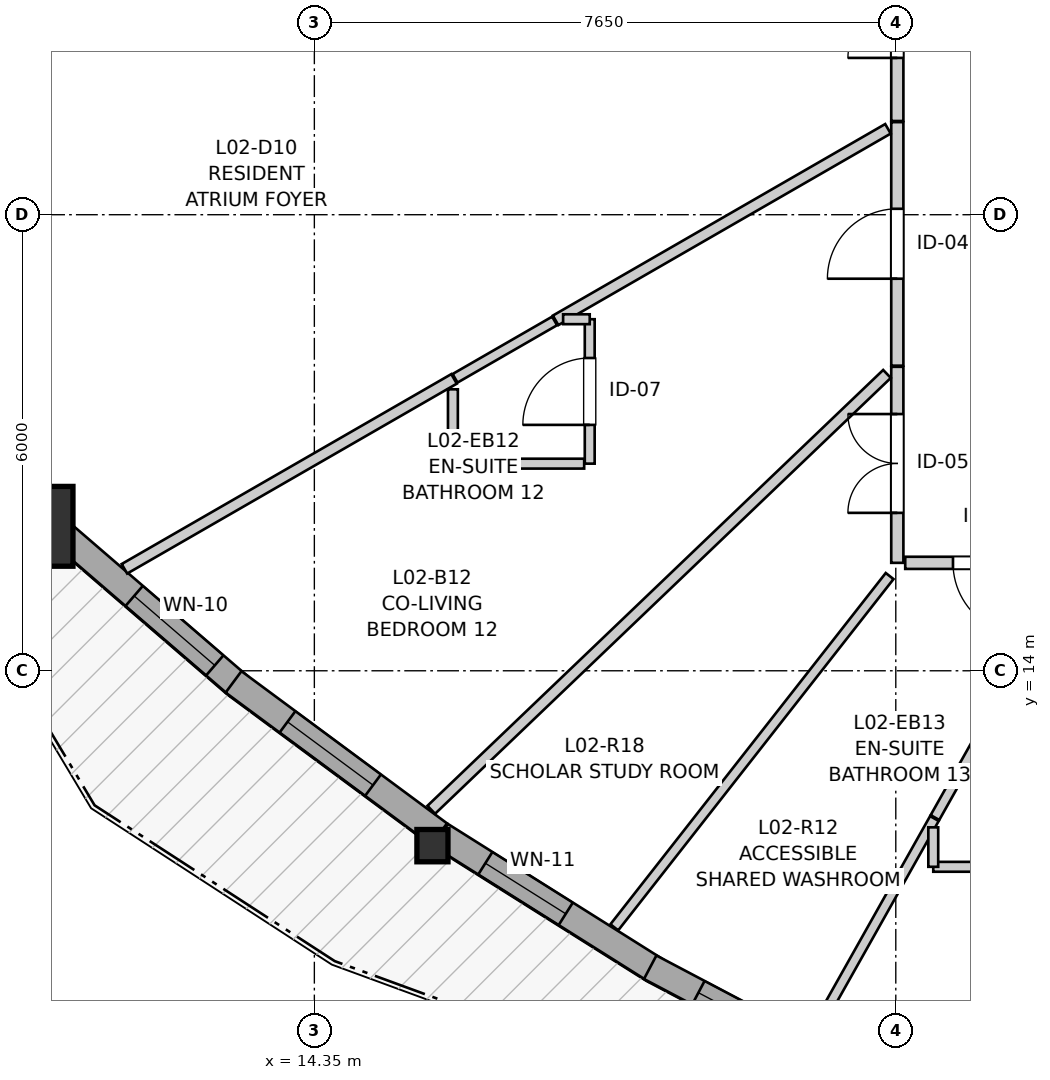
"""IFC4 building model, lengths in metres.
Left out: names, types, materials, properties, quantities, classifications, styles, units other than length and angle.
Written with IfcOpenShell. Run it as: python <this file> out.ifc"""

import sys

from ifc_helpers import new_model, si_unit, direction, frame, frame_2d, origin, origin_2d, place, context, subcontext, project, spatial, rectangle, i_section, extrude, source, transform, mapped, element, fill, save


model = new_model("IFC4")
c1 = context("Model", 3, precision=1e-05, world=origin(), true_north=direction((0.0, 1.0)))
c2 = subcontext(c1, "Body", "Model", "MODEL_VIEW")
j1 = project(units=[si_unit("LENGTHUNIT", "METRE"), si_unit("PLANEANGLEUNIT", "RADIAN")], contexts=[c1])
p1 = place(None, origin())
s1 = spatial("IfcSite", under=j1, at=p1, CompositionType="ELEMENT")
p2 = place(p1, origin())
s2 = spatial("IfcBuilding", under=s1, at=p2, CompositionType="ELEMENT")
p3 = place(p2, frame((0.0, 0.0, 11.0)))
s3 = spatial("IfcBuildingStorey", under=s2, at=p3, CompositionType="ELEMENT", Elevation=11.0)
m1 = source(origin(), c2, "Body", "SweptSolid", [
    extrude(rectangle(XDim=1.05, YDim=1.05, at=origin_2d()), origin(), (0.0, 0.0, 1.0), 2.94),
])
p4 = place(p3, frame((10.649, 15.9, 0.0), z_axis=(0.0, 0.0, 1.0), x_axis=(1.0, 0.0, 0.0)))
e1 = element("IfcColumn", 1, at=p4, inside=s3, PredefinedType="COLUMN", context=c2, shape_type="MappedRepresentation", body=[
    mapped(m1, transform((0.0, 0.0, 0.0), x_axis=(1.0, 0.0, 0.0), y_axis=(0.0, 1.0, 0.0), z_axis=(0.0, 0.0, 1.0), scale=1.0)),
])
m2 = source(origin(), c2, "Body", "SweptSolid", [
    extrude(i_section(OverallWidth=0.409, OverallDepth=0.425, WebThickness=0.03, FlangeThickness=0.048, FilletRadius=0.015, at=origin_2d()), origin(), (0.0, 0.0, 1.0), 2.94),
])
p5 = place(p3, frame((15.904, 11.699, 0.0), z_axis=(0.0, 0.0, 1.0), x_axis=(1.0, 0.0, 0.0)))
e2 = element("IfcColumn", 2, at=p5, inside=s3, PredefinedType="PILASTER", context=c2, shape_type="MappedRepresentation", body=[
    mapped(m2, transform((0.0, 0.0, 0.0), x_axis=(1.0, 0.0, 0.0), y_axis=(0.0, 1.0, 0.0), z_axis=(0.0, 0.0, 1.0), scale=1.0)),
])
p6 = place(p3, frame((10.99, 15.837, 0.0), z_axis=(0.0, 0.0, 1.0), x_axis=(0.757465946779, -0.652874673632, 0.0)))
e3 = element("IfcWall", 3, at=p6, inside=s3, PredefinedType="SOLIDWALL", context=c2, shape_type="SweptSolid", body=[
    extrude(rectangle(XDim=3.123, YDim=0.35, at=frame_2d((1.562, 0.0))), origin(), (0.0, 0.0, 1.0), 2.42),
])
p7 = place(p6, frame((1.305, 0.0, 0.82)))
e4 = element("IfcOpeningElement", 4, at=p7, cuts=e3, PredefinedType="OPENING", context=c2, shape_type="SweptSolid", body=[
    extrude(rectangle(XDim=1.4, YDim=1.35, at=frame_2d((0.7, 0.675))), frame((0.0, 0.185, 0.0), z_axis=(0.0, -1.0, 0.0), x_axis=(1.0, 0.0, 0.0)), (0.0, 0.0, 1.0), 0.37),
])
p8 = place(p3, frame((13.287, 13.854, 0.0), z_axis=(0.0, 0.0, 1.0), x_axis=(0.803848837202, -0.594833629622, 0.0)))
e5 = element("IfcWall", 5, at=p8, inside=s3, PredefinedType="SOLIDWALL", context=c2, shape_type="SweptSolid", body=[
    extrude(rectangle(XDim=3.365, YDim=0.35, at=frame_2d((1.683, 0.0))), origin(), (0.0, 0.0, 1.0), 2.42),
])
p9 = place(p8, frame((0.883, 0.0, 0.82)))
e6 = element("IfcOpeningElement", 6, at=p9, cuts=e5, PredefinedType="OPENING", context=c2, shape_type="SweptSolid", body=[
    extrude(rectangle(XDim=1.4, YDim=1.35, at=frame_2d((0.7, 0.675))), frame((0.0, 0.185, 0.0), z_axis=(0.0, -1.0, 0.0), x_axis=(1.0, 0.0, 0.0)), (0.0, 0.0, 1.0), 0.37),
])
p10 = place(p3, frame((16.014, 11.837, 0.0), z_axis=(0.0, 0.0, 1.0), x_axis=(0.846420438233, -0.532515203295, 0.0)))
e7 = element("IfcWall", 7, at=p10, inside=s3, PredefinedType="SOLIDWALL", context=c2, shape_type="SweptSolid", body=[
    extrude(rectangle(XDim=3.346, YDim=0.35, at=frame_2d((1.673, 0.0))), origin(), (0.0, 0.0, 1.0), 2.42),
])
p11 = place(p10, frame((0.692, 0.0, 0.82)))
e8 = element("IfcOpeningElement", 8, at=p11, cuts=e7, PredefinedType="OPENING", context=c2, shape_type="SweptSolid", body=[
    extrude(rectangle(XDim=1.25, YDim=1.35, at=frame_2d((0.625, 0.675))), frame((0.0, 0.185, 0.0), z_axis=(0.0, -1.0, 0.0), x_axis=(1.0, 0.0, 0.0)), (0.0, 0.0, 1.0), 0.37),
])
p12 = place(p3, frame((18.769, 10.1, 0.0), z_axis=(0.0, 0.0, 1.0), x_axis=(0.884401188265, -0.466727477438, 0.0)))
e9 = element("IfcWall", 9, at=p12, inside=s3, PredefinedType="SOLIDWALL", context=c2, shape_type="SweptSolid", body=[
    extrude(rectangle(XDim=3.066, YDim=0.35, at=frame_2d((1.533, 0.0))), origin(), (0.0, 0.0, 1.0), 2.42),
])
p13 = place(p12, frame((0.717, 0.0, 0.82)))
e10 = element("IfcOpeningElement", 10, at=p13, cuts=e9, PredefinedType="OPENING", context=c2, shape_type="SweptSolid", body=[
    extrude(rectangle(XDim=0.95, YDim=1.35, at=frame_2d((0.475, 0.675))), frame((0.0, 0.185, 0.0), z_axis=(0.0, -1.0, 0.0), x_axis=(1.0, 0.0, 0.0)), (0.0, 0.0, 1.0), 0.37),
])
p14 = place(p3, frame((22.02, 18.014, 0.0), z_axis=(0.0, 0.0, 1.0), x_axis=(0.0, 1.0, 0.0)))
e11 = element("IfcWall", 11, at=p14, inside=s3, PredefinedType="PARTITIONING", context=c2, shape_type="SweptSolid", body=[
    extrude(rectangle(XDim=3.204, YDim=0.16, at=frame_2d((1.602, 0.0))), origin(), (0.0, 0.0, 1.0), 2.94),
])
p15 = place(p14, frame((1.144, 0.0, 0.0)))
e12 = element("IfcOpeningElement", 12, at=p15, cuts=e11, PredefinedType="OPENING", context=c2, shape_type="SweptSolid", body=[
    extrude(rectangle(XDim=0.92, YDim=2.1, at=frame_2d((0.46, 1.05))), frame((0.0, 0.09, 0.0), z_axis=(0.0, -1.0, 0.0), x_axis=(1.0, 0.0, 0.0)), (0.0, 0.0, 1.0), 0.18),
])
p16 = place(p3, frame((22.02, 21.233, 0.0), z_axis=(0.0, 0.0, 1.0), x_axis=(0.0, 1.0, 0.0)))
e13 = element("IfcWall", 13, at=p16, inside=s3, PredefinedType="PARTITIONING", context=c2, shape_type="SweptSolid", body=[
    extrude(rectangle(XDim=2.917, YDim=0.16, at=frame_2d((1.458, 0.0))), origin(), (0.0, 0.0, 1.0), 2.94),
])
p17 = place(p16, frame((0.83, 0.0, 0.0)))
e14 = element("IfcOpeningElement", 14, at=p17, cuts=e13, PredefinedType="OPENING", context=c2, shape_type="SweptSolid", body=[
    extrude(rectangle(XDim=1.3, YDim=2.1, at=frame_2d((0.65, 1.05))), frame((0.0, 0.09, 0.0), z_axis=(0.0, -1.0, 0.0), x_axis=(1.0, 0.0, 0.0)), (0.0, 0.0, 1.0), 0.18),
])
p18 = place(p3, frame((22.02, 15.42, 0.0), z_axis=(0.0, 0.0, 1.0), x_axis=(0.0, 1.0, 0.0)))
e15 = element("IfcWall", 15, at=p18, inside=s3, PredefinedType="PARTITIONING", context=c2, shape_type="SweptSolid", body=[
    extrude(rectangle(XDim=2.579, YDim=0.16, at=frame_2d((1.29, 0.0))), origin(), (0.0, 0.0, 1.0), 2.94),
])
p19 = place(p18, frame((0.657, 0.0, 0.0)))
e16 = element("IfcOpeningElement", 16, at=p19, cuts=e15, PredefinedType="OPENING", context=c2, shape_type="SweptSolid", body=[
    extrude(rectangle(XDim=1.3, YDim=2.1, at=frame_2d((0.65, 1.05))), frame((0.0, 0.09, 0.0), z_axis=(0.0, -1.0, 0.0), x_axis=(1.0, 0.0, 0.0)), (0.0, 0.0, 1.0), 0.18),
])
p20 = place(p3, frame((24.368, 15.42, 0.0), z_axis=(0.0, 0.0, 1.0), x_axis=(-1.0, 0.0, 0.0)))
e17 = element("IfcWall", 17, at=p20, inside=s3, PredefinedType="PARTITIONING", context=c2, shape_type="SweptSolid", body=[
    extrude(rectangle(XDim=2.244, YDim=0.16, at=frame_2d((1.122, 0.0))), origin(), (0.0, 0.0, 1.0), 2.94),
])
p21 = place(p20, frame((0.666, 0.0, 0.0)))
e18 = element("IfcOpeningElement", 18, at=p21, cuts=e17, PredefinedType="OPENING", context=c2, shape_type="SweptSolid", body=[
    extrude(rectangle(XDim=0.95, YDim=2.1, at=frame_2d((0.475, 1.05))), frame((0.0, 0.09, 0.0), z_axis=(0.0, -1.0, 0.0), x_axis=(1.0, 0.0, 0.0)), (0.0, 0.0, 1.0), 0.18),
])
p22 = place(p3, frame((17.973, 16.725, 0.0), z_axis=(0.0, 0.0, 1.0), x_axis=(0.0, 1.0, 0.0)))
e19 = element("IfcWall", 19, at=p22, inside=s3, PredefinedType="PARTITIONING", context=c2, shape_type="SweptSolid", body=[
    extrude(rectangle(XDim=1.9, YDim=0.13, at=frame_2d((0.95, 0.0))), origin(), (0.0, 0.0, 1.0), 2.94),
])
p23 = place(p22, frame((0.51, 0.0, 0.0)))
e20 = element("IfcOpeningElement", 20, at=p23, cuts=e19, PredefinedType="OPENING", context=c2, shape_type="SweptSolid", body=[
    extrude(rectangle(XDim=0.88, YDim=2.05, at=frame_2d((0.44, 1.025))), frame((0.0, 0.075, 0.0), z_axis=(0.0, -1.0, 0.0), x_axis=(1.0, 0.0, 0.0)), (0.0, 0.0, 1.0), 0.15),
])
p24 = place(p3, frame((15.888, 12.171, 0.0), z_axis=(0.0, 0.0, 1.0), x_axis=(0.722733244608, 0.691127091886, 0.0)))
e21 = element("IfcWall", 21, at=p24, inside=s3, PredefinedType="PARTITIONING", context=c2, shape_type="SweptSolid", body=[
    extrude(rectangle(XDim=8.296, YDim=0.145, at=frame_2d((4.148, 0.0))), origin(), (0.0, 0.0, 1.0), 2.94),
])
p25 = place(p3, frame((18.296, 10.625, 0.0), z_axis=(0.0, 0.0, 1.0), x_axis=(0.616906721473, 0.787036274261, 0.0)))
e22 = element("IfcWall", 22, at=p25, inside=s3, PredefinedType="PARTITIONING", context=c2, shape_type="SweptSolid", body=[
    extrude(rectangle(XDim=5.872, YDim=0.13, at=frame_2d((2.936, 0.0))), origin(), (0.0, 0.0, 1.0), 2.94),
])
p26 = place(p3, frame((17.524, 18.61, 0.0), z_axis=(0.0, 0.0, 1.0), x_axis=(0.866454437228, 0.499256154903, 0.0)))
e23 = element("IfcWall", 23, at=p26, inside=s3, PredefinedType="PARTITIONING", context=c2, shape_type="SweptSolid", body=[
    extrude(rectangle(XDim=5.047, YDim=0.145, at=frame_2d((2.523, 0.0))), origin(), (0.0, 0.0, 1.0), 2.94),
])
p27 = place(p3, frame((11.851, 15.342, 0.0), z_axis=(0.0, 0.0, 1.0), x_axis=(0.86649075999, 0.499193111784, 0.0)))
e24 = element("IfcWall", 24, at=p27, inside=s3, PredefinedType="PARTITIONING", context=c2, shape_type="SweptSolid", body=[
    extrude(rectangle(XDim=5.005, YDim=0.145, at=frame_2d((2.502, 0.0))), origin(), (0.0, 0.0, 1.0), 2.94),
])
p28 = place(p3, frame((20.894, 9.187, 0.0), z_axis=(0.0, 0.0, 1.0), x_axis=(0.490433761368, 0.871478471169, 0.0)))
e25 = element("IfcWall", 25, at=p28, inside=s3, PredefinedType="PARTITIONING", context=c2, shape_type="SweptSolid", body=[
    extrude(rectangle(XDim=3.292, YDim=0.13, at=frame_2d((1.646, 0.0))), origin(), (0.0, 0.0, 1.0), 2.94),
])
p29 = place(p3, frame((16.173, 16.725, 0.0), z_axis=(0.0, 0.0, 1.0), x_axis=(1.0, 0.0, 0.0)))
e26 = element("IfcWall", 26, at=p29, inside=s3, PredefinedType="PARTITIONING", context=c2, shape_type="SweptSolid", body=[
    extrude(rectangle(XDim=1.727, YDim=0.13, at=frame_2d((0.863, 0.0))), origin(), (0.0, 0.0, 1.0), 2.94),
])
p30 = place(p3, frame((22.493, 11.421, 0.0), z_axis=(0.0, 0.0, 1.0), x_axis=(1.0, 0.0, 0.0)))
e27 = element("IfcWall", 27, at=p30, inside=s3, PredefinedType="PARTITIONING", context=c2, shape_type="SweptSolid", body=[
    extrude(rectangle(XDim=1.727, YDim=0.13, at=frame_2d((0.864, 0.0))), origin(), (0.0, 0.0, 1.0), 2.508),
])
p31 = place(p3, frame((16.201, 17.848, 0.0), z_axis=(0.0, 0.0, 1.0), x_axis=(0.866448907576, 0.49926575144, 0.0)))
e28 = element("IfcWall", 28, at=p31, inside=s3, PredefinedType="PARTITIONING", context=c2, shape_type="SweptSolid", body=[
    extrude(rectangle(XDim=1.512, YDim=0.13, at=frame_2d((0.756, 0.0))), origin(), (0.0, 0.0, 1.0), 2.94),
])
p32 = place(p3, frame((22.515, 12.069, 0.0), z_axis=(0.0, 0.0, 1.0), x_axis=(0.490286002917, 0.871561607314, 0.0)))
e29 = element("IfcWall", 29, at=p32, inside=s3, PredefinedType="PARTITIONING", context=c2, shape_type="SweptSolid", body=[
    extrude(rectangle(XDim=1.404, YDim=0.13, at=frame_2d((0.702, 0.0))), origin(), (0.0, 0.0, 1.0), 2.94),
])
p33 = place(p3, frame((16.173, 16.798, 0.0), z_axis=(0.0, 0.0, 1.0), x_axis=(0.0, 1.0, 0.0)))
e30 = element("IfcWall", 30, at=p33, inside=s3, PredefinedType="PARTITIONING", context=c2, shape_type="SweptSolid", body=[
    extrude(rectangle(XDim=0.905, YDim=0.13, at=frame_2d((0.452, 0.0))), origin(), (0.0, 0.0, 1.0), 2.94),
])
p34 = place(p3, frame((22.493, 11.421, 0.0), z_axis=(0.0, 0.0, 1.0), x_axis=(0.0, 1.0, 0.0)))
e31 = element("IfcWall", 31, at=p34, inside=s3, PredefinedType="PARTITIONING", context=c2, shape_type="SweptSolid", body=[
    extrude(rectangle(XDim=0.519, YDim=0.13, at=frame_2d((0.26, 0.0))), origin(), (0.0, 0.0, 1.0), 2.94),
])
p35 = place(p3, frame((17.623, 18.625, 0.0), z_axis=(0.0, 0.0, 1.0), x_axis=(1.0, 0.0, 0.0)))
e32 = element("IfcWall", 32, at=p35, inside=s3, PredefinedType="PARTITIONING", context=c2, shape_type="SweptSolid", body=[
    extrude(rectangle(XDim=0.35, YDim=0.13, at=frame_2d((0.175, 0.0))), origin(), (0.0, 0.0, 1.0), 2.94),
])
m3 = source(origin(), c2, "Body", "SweptSolid", [
    extrude(rectangle(XDim=1.4, YDim=1.35, at=frame_2d((0.7, 0.675))), frame((0.0, 0.03, 0.0), z_axis=(0.0, -1.0, 0.0), x_axis=(1.0, 0.0, 0.0)), (0.0, 0.0, 1.0), 0.06),
])
p36 = place(p7, origin())
e33 = element("IfcWindow", 33, at=p36, inside=s3, PartitioningType="SINGLE_PANEL", PredefinedType="WINDOW", context=c2, shape_type="MappedRepresentation", body=[
    mapped(m3, transform((0.0, 0.0, 0.0), x_axis=(1.0, 0.0, 0.0), y_axis=(0.0, 1.0, 0.0), z_axis=(0.0, 0.0, 1.0), scale=1.0)),
])
fill(e4, e33)
p37 = place(p9, origin())
e34 = element("IfcWindow", 34, at=p37, inside=s3, PartitioningType="SINGLE_PANEL", PredefinedType="WINDOW", context=c2, shape_type="MappedRepresentation", body=[
    mapped(m3, transform((0.0, 0.0, 0.0), x_axis=(1.0, 0.0, 0.0), y_axis=(0.0, 1.0, 0.0), z_axis=(0.0, 0.0, 1.0), scale=1.0)),
])
fill(e6, e34)
m4 = source(origin(), c2, "Body", "SweptSolid", [
    extrude(rectangle(XDim=1.25, YDim=1.35, at=frame_2d((0.625, 0.675))), frame((0.0, 0.03, 0.0), z_axis=(0.0, -1.0, 0.0), x_axis=(1.0, 0.0, 0.0)), (0.0, 0.0, 1.0), 0.06),
])
p38 = place(p11, origin())
e35 = element("IfcWindow", 35, at=p38, inside=s3, PartitioningType="SINGLE_PANEL", PredefinedType="WINDOW", context=c2, shape_type="MappedRepresentation", body=[
    mapped(m4, transform((0.0, 0.0, 0.0), x_axis=(1.0, 0.0, 0.0), y_axis=(0.0, 1.0, 0.0), z_axis=(0.0, 0.0, 1.0), scale=1.0)),
])
fill(e8, e35)
m5 = source(origin(), c2, "Body", "SweptSolid", [
    extrude(rectangle(XDim=0.95, YDim=1.35, at=frame_2d((0.475, 0.675))), frame((0.0, 0.03, 0.0), z_axis=(0.0, -1.0, 0.0), x_axis=(1.0, 0.0, 0.0)), (0.0, 0.0, 1.0), 0.06),
])
p39 = place(p13, origin())
e36 = element("IfcWindow", 36, at=p39, inside=s3, PartitioningType="SINGLE_PANEL", PredefinedType="WINDOW", context=c2, shape_type="MappedRepresentation", body=[
    mapped(m5, transform((0.0, 0.0, 0.0), x_axis=(1.0, 0.0, 0.0), y_axis=(0.0, 1.0, 0.0), z_axis=(0.0, 0.0, 1.0), scale=1.0)),
])
fill(e10, e36)
m6 = source(origin(), c2, "Body", "SweptSolid", [
    extrude(rectangle(XDim=0.92, YDim=2.1, at=frame_2d((0.46, 1.05))), frame((0.0, 0.025, 0.0), z_axis=(0.0, -1.0, 0.0), x_axis=(1.0, 0.0, 0.0)), (0.0, 0.0, 1.0), 0.05),
])
p40 = place(p15, origin())
e37 = element("IfcDoor", 37, at=p40, inside=s3, OperationType="SINGLE_SWING_LEFT", PredefinedType="DOOR", context=c2, shape_type="MappedRepresentation", body=[
    mapped(m6, transform((0.0, 0.0, 0.0), x_axis=(1.0, 0.0, 0.0), y_axis=(0.0, 1.0, 0.0), z_axis=(0.0, 0.0, 1.0), scale=1.0)),
])
fill(e12, e37)
m7 = source(origin(), c2, "Body", "SweptSolid", [
    extrude(rectangle(XDim=1.3, YDim=2.1, at=frame_2d((0.65, 1.05))), frame((0.0, 0.025, 0.0), z_axis=(0.0, -1.0, 0.0), x_axis=(1.0, 0.0, 0.0)), (0.0, 0.0, 1.0), 0.05),
])
p41 = place(p17, origin())
e38 = element("IfcDoor", 38, at=p41, inside=s3, OperationType="DOUBLE_DOOR_SINGLE_SWING", PredefinedType="DOOR", context=c2, shape_type="MappedRepresentation", body=[
    mapped(m7, transform((0.0, 0.0, 0.0), x_axis=(1.0, 0.0, 0.0), y_axis=(0.0, 1.0, 0.0), z_axis=(0.0, 0.0, 1.0), scale=1.0)),
])
fill(e14, e38)
p42 = place(p19, origin())
e39 = element("IfcDoor", 39, at=p42, inside=s3, OperationType="DOUBLE_DOOR_SINGLE_SWING", PredefinedType="DOOR", context=c2, shape_type="MappedRepresentation", body=[
    mapped(m7, transform((0.0, 0.0, 0.0), x_axis=(1.0, 0.0, 0.0), y_axis=(0.0, 1.0, 0.0), z_axis=(0.0, 0.0, 1.0), scale=1.0)),
])
fill(e16, e39)
m8 = source(origin(), c2, "Body", "SweptSolid", [
    extrude(rectangle(XDim=0.95, YDim=2.1, at=frame_2d((0.475, 1.05))), frame((0.0, 0.025, 0.0), z_axis=(0.0, -1.0, 0.0), x_axis=(1.0, 0.0, 0.0)), (0.0, 0.0, 1.0), 0.05),
])
p43 = place(p21, origin())
e40 = element("IfcDoor", 40, at=p43, inside=s3, OperationType="SINGLE_SWING_LEFT", PredefinedType="DOOR", context=c2, shape_type="MappedRepresentation", body=[
    mapped(m8, transform((0.0, 0.0, 0.0), x_axis=(1.0, 0.0, 0.0), y_axis=(0.0, 1.0, 0.0), z_axis=(0.0, 0.0, 1.0), scale=1.0)),
])
fill(e18, e40)
m9 = source(origin(), c2, "Body", "SweptSolid", [
    extrude(rectangle(XDim=0.88, YDim=2.05, at=frame_2d((0.44, 1.025))), frame((0.0, 0.025, 0.0), z_axis=(0.0, -1.0, 0.0), x_axis=(1.0, 0.0, 0.0)), (0.0, 0.0, 1.0), 0.05),
])
p44 = place(p23, origin())
e41 = element("IfcDoor", 41, at=p44, inside=s3, OperationType="SINGLE_SWING_LEFT", PredefinedType="DOOR", context=c2, shape_type="MappedRepresentation", body=[
    mapped(m9, transform((0.0, 0.0, 0.0), x_axis=(1.0, 0.0, 0.0), y_axis=(0.0, 1.0, 0.0), z_axis=(0.0, 0.0, 1.0), scale=1.0)),
])
fill(e20, e41)
save(model, sys.argv[1])
